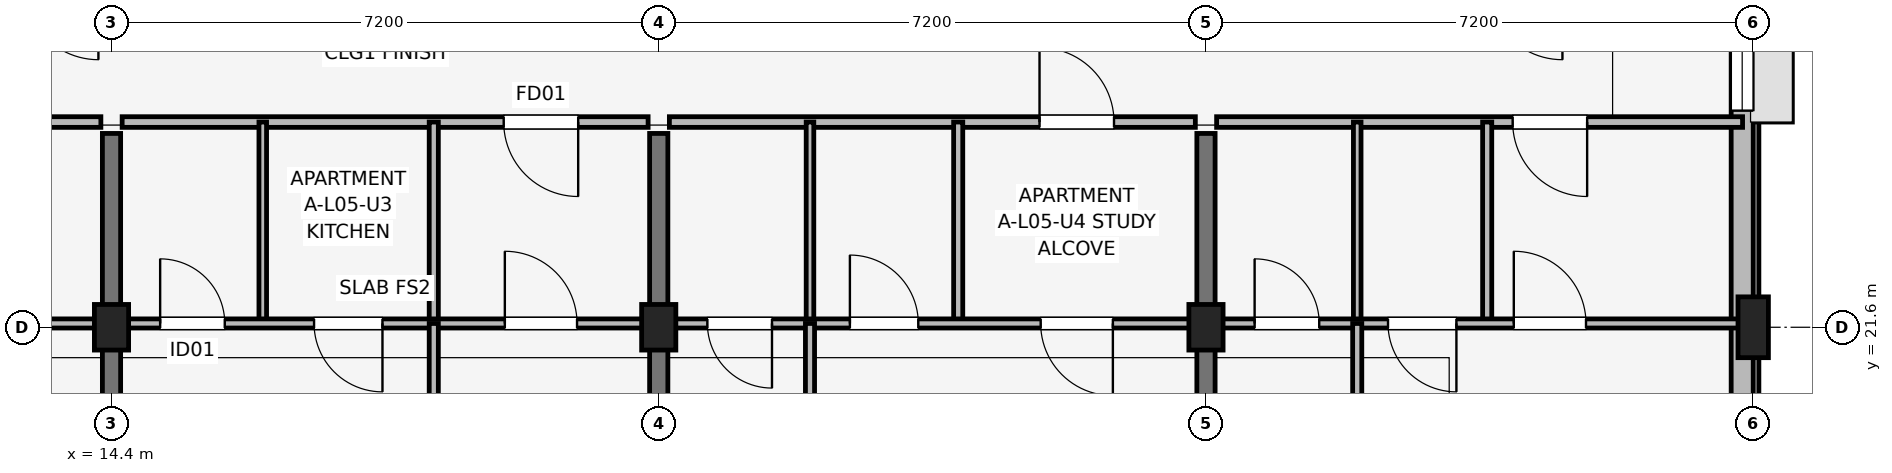
"""IFC4 building model, lengths in metres.
Left out: names, types, materials, properties, quantities, classifications, styles, units other than length and angle.
Written with IfcOpenShell. Run it as: python <this file> out.ifc"""

import sys

from ifc_helpers import new_model, si_unit, direction, frame, frame_2d, origin, origin_2d, place, context, subcontext, project, spatial, rectangle, extrude, element, fill, save


model = new_model("IFC4")
c1 = context("Model", 3, precision=1e-05, world=origin(), true_north=direction((0.0, 1.0)))
c2 = subcontext(c1, "Body", "Model", "MODEL_VIEW")
j1 = project(units=[si_unit("LENGTHUNIT", "METRE"), si_unit("PLANEANGLEUNIT", "RADIAN")], contexts=[c1])
p1 = place(None, origin())
s1 = spatial("IfcSite", under=j1, at=p1, CompositionType="ELEMENT")
p2 = place(p1, origin())
s2 = spatial("IfcBuilding", under=s1, at=p2, CompositionType="ELEMENT")
p3 = place(p2, frame((0.0, 0.0, 18.15)))
s3 = spatial("IfcBuildingStorey", under=s2, at=p3, CompositionType="ELEMENT", Elevation=18.15)
for number, where, z_axis, x_axis in (
    (1, (14.4, 21.6, 0.0), (0.0, 0.0, 1.0), (1.0, 0.0, 0.0)),
    (2, (21.6, 21.6, 0.0), (0.0, 0.0, 1.0), (1.0, 0.0, 0.0)),
    (3, (28.8, 21.6, 0.0), (0.0, 0.0, 1.0), (1.0, 0.0, 0.0)),
):
    element("IfcColumn", number, at=place(p3, frame(where, z_axis=z_axis, x_axis=x_axis)), inside=s3, PredefinedType="COLUMN", context=c2, shape_type="SweptSolid", body=[
        extrude(rectangle(XDim=0.45, YDim=0.6, at=origin_2d()), origin(), (0.0, 0.0, 1.0), 3.15),
    ])
p4 = place(p3, frame((36.0, 21.6, 0.0), z_axis=(0.0, 0.0, 1.0), x_axis=(1.0, 0.0, 0.0)))
e4 = element("IfcColumn", 4, at=p4, inside=s3, PredefinedType="COLUMN", context=c2, shape_type="SweptSolid", body=[
    extrude(rectangle(XDim=0.4, YDim=0.8, at=origin_2d()), origin(), (0.0, 0.0, 1.0), 3.15),
])
for number, where, z_axis, x_axis in (
    (5, (14.4, 14.75, 0.0), (0.0, 0.0, 1.0), (0.0, 1.0, 0.0)),
    (6, (21.6, 14.75, 0.0), (0.0, 0.0, 1.0), (0.0, 1.0, 0.0)),
    (7, (28.8, 14.75, 0.0), (0.0, 0.0, 1.0), (0.0, 1.0, 0.0)),
):
    element("IfcWall", number, at=place(p3, frame(where, z_axis=z_axis, x_axis=x_axis)), inside=s3, PredefinedType="SHEAR", context=c2, shape_type="SweptSolid", body=[
        extrude(rectangle(XDim=9.4, YDim=0.24, at=frame_2d((4.7, 0.0))), origin(), (0.0, 0.0, 1.0), 3.15),
    ])
p5 = place(p3, frame((35.855, 17.8, 0.0), z_axis=(0.0, 0.0, 1.0), x_axis=(0.0, 1.0, 0.0)))
e8 = element("IfcWall", 8, at=p5, inside=s3, PredefinedType="SOLIDWALL", context=c2, shape_type="SweptSolid", body=[
    extrude(rectangle(XDim=14.8, YDim=0.29, at=frame_2d((7.4, 0.0))), origin(), (0.0, 0.0, 1.0), 2.38),
])
p6 = place(p5, frame((6.65, 0.0, 1.05)))
e9 = element("IfcOpeningElement", 9, at=p6, cuts=e8, PredefinedType="OPENING", context=c2, shape_type="SweptSolid", body=[
    extrude(rectangle(XDim=1.5, YDim=1.15, at=frame_2d((0.75, 0.575))), frame((0.0, 0.155, 0.0), z_axis=(0.0, -1.0, 0.0), x_axis=(1.0, 0.0, 0.0)), (0.0, 0.0, 1.0), 0.31),
])
p7 = place(p5, frame((1.135, 0.0, 0.72)))
e10 = element("IfcOpeningElement", 10, at=p7, cuts=e8, PredefinedType="OPENING", context=c2, shape_type="SweptSolid", body=[
    extrude(rectangle(XDim=1.3, YDim=1.55, at=frame_2d((0.65, 0.775))), frame((0.0, 0.155, 0.0), z_axis=(0.0, -1.0, 0.0), x_axis=(1.0, 0.0, 0.0)), (0.0, 0.0, 1.0), 0.31),
])
p8 = place(p3, frame((7.34, 24.3, 0.0), z_axis=(0.0, 0.0, 1.0), x_axis=(1.0, 0.0, 0.0)))
e11 = element("IfcWall", 11, at=p8, inside=s3, PredefinedType="PARTITIONING", context=c2, shape_type="SweptSolid", body=[
    extrude(rectangle(XDim=6.92, YDim=0.14, at=frame_2d((3.46, 0.0))), origin(), (0.0, 0.0, 1.0), 2.38),
])
p9 = place(p8, frame((5.85, 0.0, 0.0), z_axis=(0.0, 0.0, 1.0), x_axis=(-1.0, 0.0, 0.0)))
e12 = element("IfcOpeningElement", 12, at=p9, cuts=e11, PredefinedType="OPENING", context=c2, shape_type="SweptSolid", body=[
    extrude(rectangle(XDim=0.98, YDim=2.1, at=frame_2d((0.49, 1.05))), frame((0.0, 0.08, 0.0), z_axis=(0.0, -1.0, 0.0), x_axis=(1.0, 0.0, 0.0)), (0.0, 0.0, 1.0), 0.16),
])
p10 = place(p3, frame((7.34, 21.65, 0.0), z_axis=(0.0, 0.0, 1.0), x_axis=(1.0, 0.0, 0.0)))
e13 = element("IfcWall", 13, at=p10, inside=s3, PredefinedType="PARTITIONING", context=c2, shape_type="SweptSolid", body=[
    extrude(rectangle(XDim=6.92, YDim=0.12, at=frame_2d((3.46, 0.0))), origin(), (0.0, 0.0, 1.0), 2.375),
])
p11 = place(p10, frame((0.5, 0.0, 0.0)))
e14 = element("IfcOpeningElement", 14, at=p11, cuts=e13, PredefinedType="OPENING", context=c2, shape_type="SweptSolid", body=[
    extrude(rectangle(XDim=0.85, YDim=2.08, at=frame_2d((0.425, 1.04))), frame((0.0, 0.07, 0.0), z_axis=(0.0, -1.0, 0.0), x_axis=(1.0, 0.0, 0.0)), (0.0, 0.0, 1.0), 0.14),
])
p12 = place(p10, frame((3.275, 0.0, 0.0), z_axis=(0.0, 0.0, 1.0), x_axis=(-1.0, 0.0, 0.0)))
e15 = element("IfcOpeningElement", 15, at=p12, cuts=e13, PredefinedType="OPENING", context=c2, shape_type="SweptSolid", body=[
    extrude(rectangle(XDim=0.9, YDim=2.08, at=frame_2d((0.45, 1.04))), frame((0.0, 0.07, 0.0), z_axis=(0.0, -1.0, 0.0), x_axis=(1.0, 0.0, 0.0)), (0.0, 0.0, 1.0), 0.14),
])
p13 = place(p10, frame((4.885, 0.0, 0.0)))
e16 = element("IfcOpeningElement", 16, at=p13, cuts=e13, PredefinedType="OPENING", context=c2, shape_type="SweptSolid", body=[
    extrude(rectangle(XDim=0.95, YDim=2.08, at=frame_2d((0.475, 1.04))), frame((0.0, 0.07, 0.0), z_axis=(0.0, -1.0, 0.0), x_axis=(1.0, 0.0, 0.0)), (0.0, 0.0, 1.0), 0.14),
])
p14 = place(p3, frame((14.54, 24.3, 0.0), z_axis=(0.0, 0.0, 1.0), x_axis=(1.0, 0.0, 0.0)))
e17 = element("IfcWall", 17, at=p14, inside=s3, PredefinedType="PARTITIONING", context=c2, shape_type="SweptSolid", body=[
    extrude(rectangle(XDim=6.92, YDim=0.14, at=frame_2d((3.46, 0.0))), origin(), (0.0, 0.0, 1.0), 2.38),
])
p15 = place(p14, frame((6.0, 0.0, 0.0), z_axis=(0.0, 0.0, 1.0), x_axis=(-1.0, 0.0, 0.0)))
e18 = element("IfcOpeningElement", 18, at=p15, cuts=e17, PredefinedType="OPENING", context=c2, shape_type="SweptSolid", body=[
    extrude(rectangle(XDim=0.98, YDim=2.1, at=frame_2d((0.49, 1.05))), frame((0.0, 0.08, 0.0), z_axis=(0.0, -1.0, 0.0), x_axis=(1.0, 0.0, 0.0)), (0.0, 0.0, 1.0), 0.16),
])
p16 = place(p3, frame((16.39, 21.65, 0.0), z_axis=(0.0, 0.0, 1.0), x_axis=(0.0, 1.0, 0.0)))
e19 = element("IfcWall", 19, at=p16, inside=s3, PredefinedType="PARTITIONING", context=c2, shape_type="SweptSolid", body=[
    extrude(rectangle(XDim=2.65, YDim=0.1, at=frame_2d((1.325, 0.0))), origin(), (0.0, 0.0, 1.0), 2.375),
])
p17 = place(p3, frame((18.64, 21.65, 0.0), z_axis=(0.0, 0.0, 1.0), x_axis=(0.0, 1.0, 0.0)))
e20 = element("IfcWall", 20, at=p17, inside=s3, PredefinedType="PARTITIONING", context=c2, shape_type="SweptSolid", body=[
    extrude(rectangle(XDim=2.65, YDim=0.12, at=frame_2d((1.325, 0.0))), origin(), (0.0, 0.0, 1.0), 2.375),
])
p18 = place(p3, frame((14.54, 21.65, 0.0), z_axis=(0.0, 0.0, 1.0), x_axis=(1.0, 0.0, 0.0)))
e21 = element("IfcWall", 21, at=p18, inside=s3, PredefinedType="PARTITIONING", context=c2, shape_type="SweptSolid", body=[
    extrude(rectangle(XDim=6.92, YDim=0.12, at=frame_2d((3.46, 0.0))), origin(), (0.0, 0.0, 1.0), 2.375),
])
p19 = place(p18, frame((0.5, 0.0, 0.0)))
e22 = element("IfcOpeningElement", 22, at=p19, cuts=e21, PredefinedType="OPENING", context=c2, shape_type="SweptSolid", body=[
    extrude(rectangle(XDim=0.85, YDim=2.08, at=frame_2d((0.425, 1.04))), frame((0.0, 0.07, 0.0), z_axis=(0.0, -1.0, 0.0), x_axis=(1.0, 0.0, 0.0)), (0.0, 0.0, 1.0), 0.14),
])
p20 = place(p18, frame((3.425, 0.0, 0.0), z_axis=(0.0, 0.0, 1.0), x_axis=(-1.0, 0.0, 0.0)))
e23 = element("IfcOpeningElement", 23, at=p20, cuts=e21, PredefinedType="OPENING", context=c2, shape_type="SweptSolid", body=[
    extrude(rectangle(XDim=0.9, YDim=2.08, at=frame_2d((0.45, 1.04))), frame((0.0, 0.07, 0.0), z_axis=(0.0, -1.0, 0.0), x_axis=(1.0, 0.0, 0.0)), (0.0, 0.0, 1.0), 0.14),
])
p21 = place(p18, frame((5.035, 0.0, 0.0)))
e24 = element("IfcOpeningElement", 24, at=p21, cuts=e21, PredefinedType="OPENING", context=c2, shape_type="SweptSolid", body=[
    extrude(rectangle(XDim=0.95, YDim=2.08, at=frame_2d((0.475, 1.04))), frame((0.0, 0.07, 0.0), z_axis=(0.0, -1.0, 0.0), x_axis=(1.0, 0.0, 0.0)), (0.0, 0.0, 1.0), 0.14),
])
p22 = place(p3, frame((18.64, 14.7, 0.0), z_axis=(0.0, 0.0, 1.0), x_axis=(0.0, 1.0, 0.0)))
e25 = element("IfcWall", 25, at=p22, inside=s3, PredefinedType="PARTITIONING", context=c2, shape_type="SweptSolid", body=[
    extrude(rectangle(XDim=6.95, YDim=0.12, at=frame_2d((3.475, 0.0))), origin(), (0.0, 0.0, 1.0), 2.375),
])
p23 = place(p22, frame((3.925, 0.0, 0.0), z_axis=(0.0, 0.0, 1.0), x_axis=(-1.0, 0.0, 0.0)))
e26 = element("IfcOpeningElement", 26, at=p23, cuts=e25, PredefinedType="OPENING", context=c2, shape_type="SweptSolid", body=[
    extrude(rectangle(XDim=0.9, YDim=2.08, at=frame_2d((0.45, 1.04))), frame((0.0, 0.07, 0.0), z_axis=(0.0, -1.0, 0.0), x_axis=(1.0, 0.0, 0.0)), (0.0, 0.0, 1.0), 0.14),
])
p24 = place(p3, frame((21.74, 24.3, 0.0), z_axis=(0.0, 0.0, 1.0), x_axis=(1.0, 0.0, 0.0)))
e27 = element("IfcWall", 27, at=p24, inside=s3, PredefinedType="PARTITIONING", context=c2, shape_type="SweptSolid", body=[
    extrude(rectangle(XDim=6.92, YDim=0.14, at=frame_2d((3.46, 0.0))), origin(), (0.0, 0.0, 1.0), 2.38),
])
p25 = place(p24, frame((4.87, 0.0, 0.0)))
e28 = element("IfcOpeningElement", 28, at=p25, cuts=e27, PredefinedType="OPENING", context=c2, shape_type="SweptSolid", body=[
    extrude(rectangle(XDim=0.98, YDim=2.1, at=frame_2d((0.49, 1.05))), frame((0.0, 0.08, 0.0), z_axis=(0.0, -1.0, 0.0), x_axis=(1.0, 0.0, 0.0)), (0.0, 0.0, 1.0), 0.16),
])
p26 = place(p3, frame((23.59, 21.65, 0.0), z_axis=(0.0, 0.0, 1.0), x_axis=(0.0, 1.0, 0.0)))
e29 = element("IfcWall", 29, at=p26, inside=s3, PredefinedType="PARTITIONING", context=c2, shape_type="SweptSolid", body=[
    extrude(rectangle(XDim=2.65, YDim=0.1, at=frame_2d((1.325, 0.0))), origin(), (0.0, 0.0, 1.0), 2.375),
])
p27 = place(p3, frame((25.54, 21.65, 0.0), z_axis=(0.0, 0.0, 1.0), x_axis=(0.0, 1.0, 0.0)))
e30 = element("IfcWall", 30, at=p27, inside=s3, PredefinedType="PARTITIONING", context=c2, shape_type="SweptSolid", body=[
    extrude(rectangle(XDim=2.65, YDim=0.12, at=frame_2d((1.325, 0.0))), origin(), (0.0, 0.0, 1.0), 2.375),
])
p28 = place(p3, frame((21.74, 21.65, 0.0), z_axis=(0.0, 0.0, 1.0), x_axis=(1.0, 0.0, 0.0)))
e31 = element("IfcWall", 31, at=p28, inside=s3, PredefinedType="PARTITIONING", context=c2, shape_type="SweptSolid", body=[
    extrude(rectangle(XDim=6.92, YDim=0.12, at=frame_2d((3.46, 0.0))), origin(), (0.0, 0.0, 1.0), 2.375),
])
p29 = place(p28, frame((1.35, 0.0, 0.0), z_axis=(0.0, 0.0, 1.0), x_axis=(-1.0, 0.0, 0.0)))
e32 = element("IfcOpeningElement", 32, at=p29, cuts=e31, PredefinedType="OPENING", context=c2, shape_type="SweptSolid", body=[
    extrude(rectangle(XDim=0.85, YDim=2.08, at=frame_2d((0.425, 1.04))), frame((0.0, 0.07, 0.0), z_axis=(0.0, -1.0, 0.0), x_axis=(1.0, 0.0, 0.0)), (0.0, 0.0, 1.0), 0.14),
])
p30 = place(p28, frame((2.375, 0.0, 0.0)))
e33 = element("IfcOpeningElement", 33, at=p30, cuts=e31, PredefinedType="OPENING", context=c2, shape_type="SweptSolid", body=[
    extrude(rectangle(XDim=0.9, YDim=2.08, at=frame_2d((0.45, 1.04))), frame((0.0, 0.07, 0.0), z_axis=(0.0, -1.0, 0.0), x_axis=(1.0, 0.0, 0.0)), (0.0, 0.0, 1.0), 0.14),
])
p31 = place(p28, frame((5.835, 0.0, 0.0), z_axis=(0.0, 0.0, 1.0), x_axis=(-1.0, 0.0, 0.0)))
e34 = element("IfcOpeningElement", 34, at=p31, cuts=e31, PredefinedType="OPENING", context=c2, shape_type="SweptSolid", body=[
    extrude(rectangle(XDim=0.95, YDim=2.08, at=frame_2d((0.475, 1.04))), frame((0.0, 0.07, 0.0), z_axis=(0.0, -1.0, 0.0), x_axis=(1.0, 0.0, 0.0)), (0.0, 0.0, 1.0), 0.14),
])
p32 = place(p3, frame((23.59, 14.7, 0.0), z_axis=(0.0, 0.0, 1.0), x_axis=(0.0, 1.0, 0.0)))
e35 = element("IfcWall", 35, at=p32, inside=s3, PredefinedType="PARTITIONING", context=c2, shape_type="SweptSolid", body=[
    extrude(rectangle(XDim=6.95, YDim=0.12, at=frame_2d((3.475, 0.0))), origin(), (0.0, 0.0, 1.0), 2.375),
])
p33 = place(p32, frame((3.025, 0.0, 0.0)))
e36 = element("IfcOpeningElement", 36, at=p33, cuts=e35, PredefinedType="OPENING", context=c2, shape_type="SweptSolid", body=[
    extrude(rectangle(XDim=0.9, YDim=2.08, at=frame_2d((0.45, 1.04))), frame((0.0, 0.07, 0.0), z_axis=(0.0, -1.0, 0.0), x_axis=(1.0, 0.0, 0.0)), (0.0, 0.0, 1.0), 0.14),
])
p34 = place(p3, frame((28.94, 24.3, 0.0), z_axis=(0.0, 0.0, 1.0), x_axis=(1.0, 0.0, 0.0)))
e37 = element("IfcWall", 37, at=p34, inside=s3, PredefinedType="PARTITIONING", context=c2, shape_type="SweptSolid", body=[
    extrude(rectangle(XDim=6.92, YDim=0.14, at=frame_2d((3.46, 0.0))), origin(), (0.0, 0.0, 1.0), 2.38),
])
p35 = place(p34, frame((4.875, 0.0, 0.0), z_axis=(0.0, 0.0, 1.0), x_axis=(-1.0, 0.0, 0.0)))
e38 = element("IfcOpeningElement", 38, at=p35, cuts=e37, PredefinedType="OPENING", context=c2, shape_type="SweptSolid", body=[
    extrude(rectangle(XDim=0.98, YDim=2.1, at=frame_2d((0.49, 1.05))), frame((0.0, 0.08, 0.0), z_axis=(0.0, -1.0, 0.0), x_axis=(1.0, 0.0, 0.0)), (0.0, 0.0, 1.0), 0.16),
])
p36 = place(p3, frame((30.79, 21.65, 0.0), z_axis=(0.0, 0.0, 1.0), x_axis=(0.0, 1.0, 0.0)))
e39 = element("IfcWall", 39, at=p36, inside=s3, PredefinedType="PARTITIONING", context=c2, shape_type="SweptSolid", body=[
    extrude(rectangle(XDim=2.65, YDim=0.1, at=frame_2d((1.325, 0.0))), origin(), (0.0, 0.0, 1.0), 2.375),
])
p37 = place(p3, frame((32.5, 21.65, 0.0), z_axis=(0.0, 0.0, 1.0), x_axis=(0.0, 1.0, 0.0)))
e40 = element("IfcWall", 40, at=p37, inside=s3, PredefinedType="PARTITIONING", context=c2, shape_type="SweptSolid", body=[
    extrude(rectangle(XDim=2.65, YDim=0.12, at=frame_2d((1.325, 0.0))), origin(), (0.0, 0.0, 1.0), 2.375),
])
p38 = place(p3, frame((28.94, 21.65, 0.0), z_axis=(0.0, 0.0, 1.0), x_axis=(1.0, 0.0, 0.0)))
e41 = element("IfcWall", 41, at=p38, inside=s3, PredefinedType="PARTITIONING", context=c2, shape_type="SweptSolid", body=[
    extrude(rectangle(XDim=6.92, YDim=0.12, at=frame_2d((3.46, 0.0))), origin(), (0.0, 0.0, 1.0), 2.375),
])
p39 = place(p38, frame((0.5, 0.0, 0.0)))
e42 = element("IfcOpeningElement", 42, at=p39, cuts=e41, PredefinedType="OPENING", context=c2, shape_type="SweptSolid", body=[
    extrude(rectangle(XDim=0.85, YDim=2.08, at=frame_2d((0.425, 1.04))), frame((0.0, 0.07, 0.0), z_axis=(0.0, -1.0, 0.0), x_axis=(1.0, 0.0, 0.0)), (0.0, 0.0, 1.0), 0.14),
])
p40 = place(p38, frame((3.155, 0.0, 0.0), z_axis=(0.0, 0.0, 1.0), x_axis=(-1.0, 0.0, 0.0)))
e43 = element("IfcOpeningElement", 43, at=p40, cuts=e41, PredefinedType="OPENING", context=c2, shape_type="SweptSolid", body=[
    extrude(rectangle(XDim=0.9, YDim=2.08, at=frame_2d((0.45, 1.04))), frame((0.0, 0.07, 0.0), z_axis=(0.0, -1.0, 0.0), x_axis=(1.0, 0.0, 0.0)), (0.0, 0.0, 1.0), 0.14),
])
p41 = place(p38, frame((3.91, 0.0, 0.0)))
e44 = element("IfcOpeningElement", 44, at=p41, cuts=e41, PredefinedType="OPENING", context=c2, shape_type="SweptSolid", body=[
    extrude(rectangle(XDim=0.95, YDim=2.08, at=frame_2d((0.475, 1.04))), frame((0.0, 0.07, 0.0), z_axis=(0.0, -1.0, 0.0), x_axis=(1.0, 0.0, 0.0)), (0.0, 0.0, 1.0), 0.14),
])
p42 = place(p3, frame((30.79, 14.7, 0.0), z_axis=(0.0, 0.0, 1.0), x_axis=(0.0, 1.0, 0.0)))
e45 = element("IfcWall", 45, at=p42, inside=s3, PredefinedType="PARTITIONING", context=c2, shape_type="SweptSolid", body=[
    extrude(rectangle(XDim=6.95, YDim=0.12, at=frame_2d((3.475, 0.0))), origin(), (0.0, 0.0, 1.0), 2.375),
])
p43 = place(p42, frame((3.925, 0.0, 0.0), z_axis=(0.0, 0.0, 1.0), x_axis=(-1.0, 0.0, 0.0)))
e46 = element("IfcOpeningElement", 46, at=p43, cuts=e45, PredefinedType="OPENING", context=c2, shape_type="SweptSolid", body=[
    extrude(rectangle(XDim=0.9, YDim=2.08, at=frame_2d((0.45, 1.04))), frame((0.0, 0.07, 0.0), z_axis=(0.0, -1.0, 0.0), x_axis=(1.0, 0.0, 0.0)), (0.0, 0.0, 1.0), 0.14),
])
p44 = place(p6, origin())
e47 = element("IfcWindow", 47, at=p44, inside=s3, PartitioningType="SINGLE_PANEL", PredefinedType="WINDOW", context=c2, shape_type="SweptSolid", body=[
    extrude(rectangle(XDim=1.5, YDim=1.15, at=frame_2d((0.75, 0.575))), frame((0.0, 0.03, 0.0), z_axis=(0.0, -1.0, 0.0), x_axis=(1.0, 0.0, 0.0)), (0.0, 0.0, 1.0), 0.06),
])
fill(e9, e47)
p45 = place(p15, origin())
e48 = element("IfcDoor", 48, at=p45, inside=s3, OperationType="SINGLE_SWING_RIGHT", PredefinedType="DOOR", context=c2, shape_type="SweptSolid", body=[
    extrude(rectangle(XDim=0.98, YDim=2.1, at=frame_2d((0.49, 1.05))), frame((0.0, 0.025, 0.0), z_axis=(0.0, -1.0, 0.0), x_axis=(1.0, 0.0, 0.0)), (0.0, 0.0, 1.0), 0.05),
])
fill(e18, e48)
p46 = place(p19, origin())
e49 = element("IfcDoor", 49, at=p46, inside=s3, OperationType="SINGLE_SWING_LEFT", PredefinedType="DOOR", context=c2, shape_type="SweptSolid", body=[
    extrude(rectangle(XDim=0.85, YDim=2.08, at=frame_2d((0.425, 1.04))), frame((0.0, 0.025, 0.0), z_axis=(0.0, -1.0, 0.0), x_axis=(1.0, 0.0, 0.0)), (0.0, 0.0, 1.0), 0.05),
])
fill(e22, e49)
p47 = place(p20, origin())
e50 = element("IfcDoor", 50, at=p47, inside=s3, OperationType="SINGLE_SWING_RIGHT", PredefinedType="DOOR", context=c2, shape_type="SweptSolid", body=[
    extrude(rectangle(XDim=0.9, YDim=2.08, at=frame_2d((0.45, 1.04))), frame((0.0, 0.025, 0.0), z_axis=(0.0, -1.0, 0.0), x_axis=(1.0, 0.0, 0.0)), (0.0, 0.0, 1.0), 0.05),
])
fill(e23, e50)
p48 = place(p21, origin())
e51 = element("IfcDoor", 51, at=p48, inside=s3, OperationType="SINGLE_SWING_LEFT", PredefinedType="DOOR", context=c2, shape_type="SweptSolid", body=[
    extrude(rectangle(XDim=0.95, YDim=2.08, at=frame_2d((0.475, 1.04))), frame((0.0, 0.025, 0.0), z_axis=(0.0, -1.0, 0.0), x_axis=(1.0, 0.0, 0.0)), (0.0, 0.0, 1.0), 0.05),
])
fill(e24, e51)
p49 = place(p25, origin())
e52 = element("IfcDoor", 52, at=p49, inside=s3, OperationType="SINGLE_SWING_LEFT", PredefinedType="DOOR", context=c2, shape_type="SweptSolid", body=[
    extrude(rectangle(XDim=0.98, YDim=2.1, at=frame_2d((0.49, 1.05))), frame((0.0, 0.025, 0.0), z_axis=(0.0, -1.0, 0.0), x_axis=(1.0, 0.0, 0.0)), (0.0, 0.0, 1.0), 0.05),
])
fill(e28, e52)
p50 = place(p29, origin())
e53 = element("IfcDoor", 53, at=p50, inside=s3, OperationType="SINGLE_SWING_RIGHT", PredefinedType="DOOR", context=c2, shape_type="SweptSolid", body=[
    extrude(rectangle(XDim=0.85, YDim=2.08, at=frame_2d((0.425, 1.04))), frame((0.0, 0.025, 0.0), z_axis=(0.0, -1.0, 0.0), x_axis=(1.0, 0.0, 0.0)), (0.0, 0.0, 1.0), 0.05),
])
fill(e32, e53)
p51 = place(p30, origin())
e54 = element("IfcDoor", 54, at=p51, inside=s3, OperationType="SINGLE_SWING_LEFT", PredefinedType="DOOR", context=c2, shape_type="SweptSolid", body=[
    extrude(rectangle(XDim=0.9, YDim=2.08, at=frame_2d((0.45, 1.04))), frame((0.0, 0.025, 0.0), z_axis=(0.0, -1.0, 0.0), x_axis=(1.0, 0.0, 0.0)), (0.0, 0.0, 1.0), 0.05),
])
fill(e33, e54)
p52 = place(p31, origin())
e55 = element("IfcDoor", 55, at=p52, inside=s3, OperationType="SINGLE_SWING_RIGHT", PredefinedType="DOOR", context=c2, shape_type="SweptSolid", body=[
    extrude(rectangle(XDim=0.95, YDim=2.08, at=frame_2d((0.475, 1.04))), frame((0.0, 0.025, 0.0), z_axis=(0.0, -1.0, 0.0), x_axis=(1.0, 0.0, 0.0)), (0.0, 0.0, 1.0), 0.05),
])
fill(e34, e55)
p53 = place(p35, origin())
e56 = element("IfcDoor", 56, at=p53, inside=s3, OperationType="SINGLE_SWING_RIGHT", PredefinedType="DOOR", context=c2, shape_type="SweptSolid", body=[
    extrude(rectangle(XDim=0.98, YDim=2.1, at=frame_2d((0.49, 1.05))), frame((0.0, 0.025, 0.0), z_axis=(0.0, -1.0, 0.0), x_axis=(1.0, 0.0, 0.0)), (0.0, 0.0, 1.0), 0.05),
])
fill(e38, e56)
p54 = place(p39, origin())
e57 = element("IfcDoor", 57, at=p54, inside=s3, OperationType="SINGLE_SWING_LEFT", PredefinedType="DOOR", context=c2, shape_type="SweptSolid", body=[
    extrude(rectangle(XDim=0.85, YDim=2.08, at=frame_2d((0.425, 1.04))), frame((0.0, 0.025, 0.0), z_axis=(0.0, -1.0, 0.0), x_axis=(1.0, 0.0, 0.0)), (0.0, 0.0, 1.0), 0.05),
])
fill(e42, e57)
p55 = place(p40, origin())
e58 = element("IfcDoor", 58, at=p55, inside=s3, OperationType="SINGLE_SWING_RIGHT", PredefinedType="DOOR", context=c2, shape_type="SweptSolid", body=[
    extrude(rectangle(XDim=0.9, YDim=2.08, at=frame_2d((0.45, 1.04))), frame((0.0, 0.025, 0.0), z_axis=(0.0, -1.0, 0.0), x_axis=(1.0, 0.0, 0.0)), (0.0, 0.0, 1.0), 0.05),
])
fill(e43, e58)
p56 = place(p41, origin())
e59 = element("IfcDoor", 59, at=p56, inside=s3, OperationType="SINGLE_SWING_LEFT", PredefinedType="DOOR", context=c2, shape_type="SweptSolid", body=[
    extrude(rectangle(XDim=0.95, YDim=2.08, at=frame_2d((0.475, 1.04))), frame((0.0, 0.025, 0.0), z_axis=(0.0, -1.0, 0.0), x_axis=(1.0, 0.0, 0.0)), (0.0, 0.0, 1.0), 0.05),
])
fill(e44, e59)
save(model, sys.argv[1])
